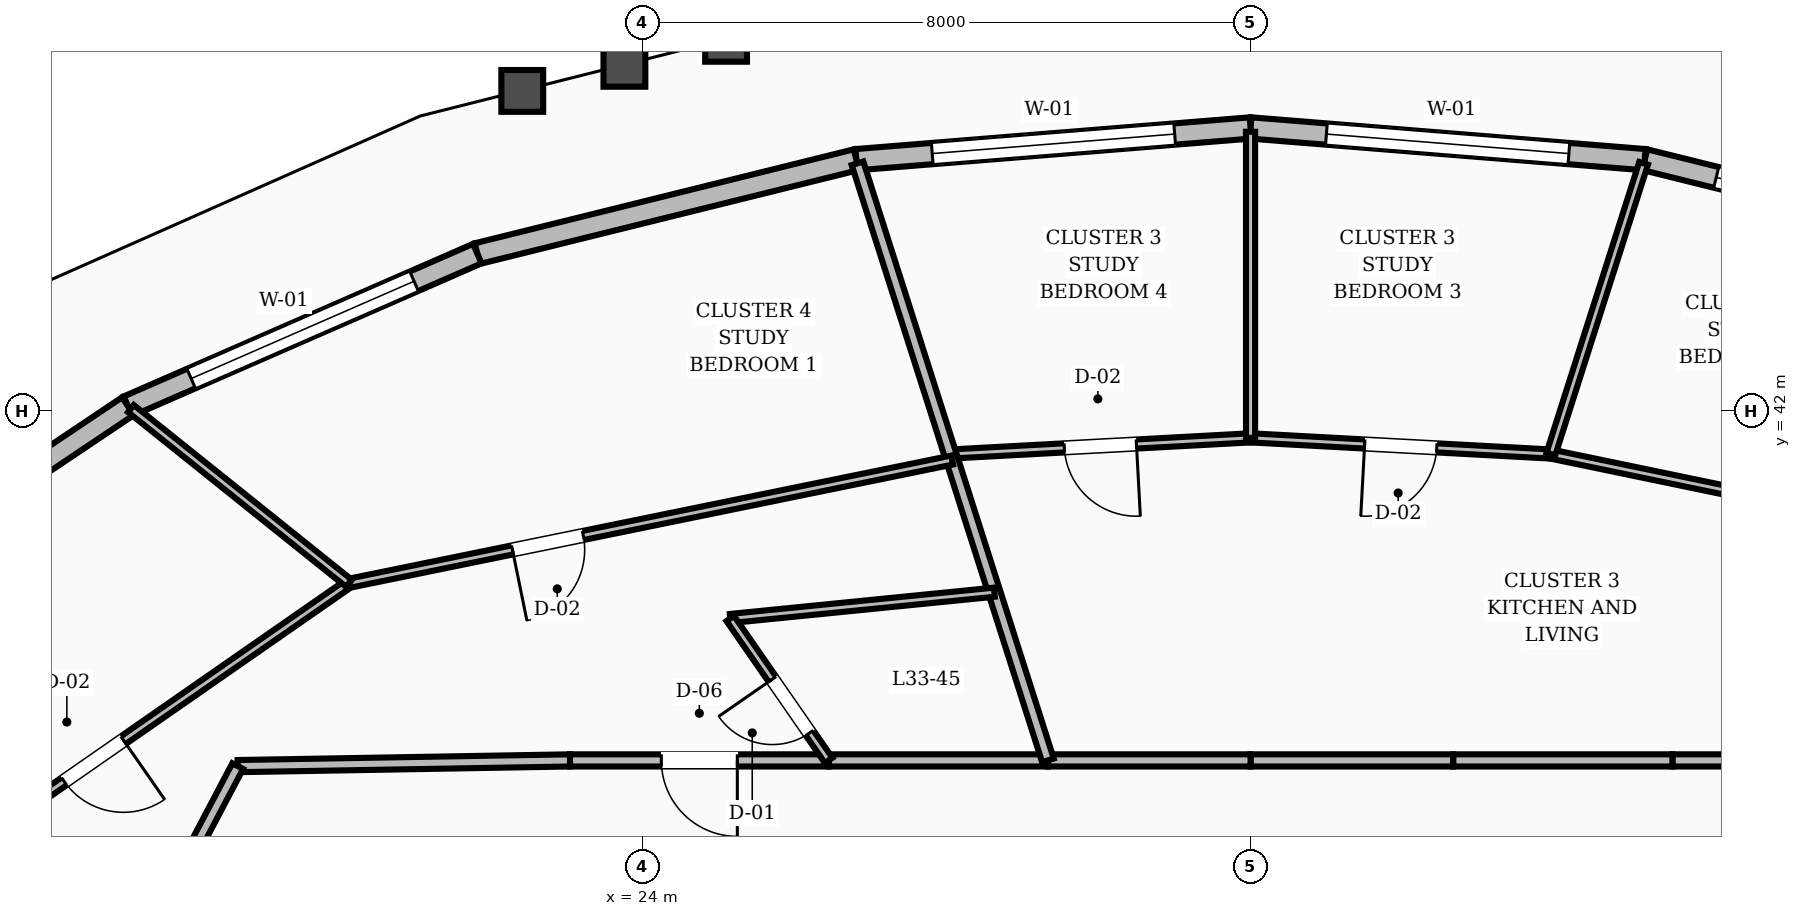
"""IFC4 building model, lengths in metres.
Left out: names, types, materials, properties, quantities, classifications, styles, units other than length and angle.
Written with IfcOpenShell. Run it as: python <this file> out.ifc"""

import sys

from ifc_helpers import new_model, si_unit, direction, frame, frame_2d, origin, place, context, subcontext, project, spatial, rectangle, extrude, element, fill, save


model = new_model("IFC4")
c1 = context("Model", 3, precision=1e-05, world=origin(), true_north=direction((0.0, 1.0)))
c2 = subcontext(c1, "Body", "Model", "MODEL_VIEW")
j1 = project(units=[si_unit("LENGTHUNIT", "METRE"), si_unit("PLANEANGLEUNIT", "RADIAN")], contexts=[c1])
p1 = place(None, origin())
s1 = spatial("IfcSite", under=j1, at=p1, CompositionType="ELEMENT")
p2 = place(p1, origin())
s2 = spatial("IfcBuilding", under=s1, at=p2, CompositionType="ELEMENT")
p3 = place(p2, frame((0.0, 0.0, 131.6)))
s3 = spatial("IfcBuildingStorey", under=s2, at=p3, CompositionType="ELEMENT", Elevation=131.6)
p4 = place(p3, frame((42.173, 44.067, 0.0), z_axis=(0.0, 0.0, 1.0), x_axis=(-0.970626922291, 0.24058964592, 0.0)))
e1 = element("IfcWall", 1, at=p4, inside=s3, PredefinedType="STANDARD", context=c2, shape_type="SweptSolid", body=[
    extrude(rectangle(XDim=5.138, YDim=0.28, at=frame_2d((2.569, 0.0))), origin(), (0.0, 0.0, 1.0), 2.82),
])
p5 = place(p4, frame((0.969, 0.0, 0.8)))
e2 = element("IfcOpeningElement", 2, at=p5, cuts=e1, PredefinedType="OPENING", context=c2, shape_type="SweptSolid", body=[
    extrude(rectangle(XDim=3.2, YDim=1.65, at=frame_2d((1.6, 0.825))), frame((0.0, 0.15, 0.0), z_axis=(0.0, -1.0, 0.0), x_axis=(1.0, 0.0, 0.0)), (0.0, 0.0, 1.0), 0.3),
])
p6 = place(p3, frame((37.186, 45.303, 0.0), z_axis=(0.0, 0.0, 1.0), x_axis=(-0.996775768856, 0.080237563656, 0.0)))
e3 = element("IfcWall", 3, at=p6, inside=s3, PredefinedType="STANDARD", context=c2, shape_type="SweptSolid", body=[
    extrude(rectangle(XDim=5.203, YDim=0.28, at=frame_2d((2.602, 0.0))), origin(), (0.0, 0.0, 1.0), 2.82),
])
p7 = place(p6, frame((1.001, 0.0, 0.8)))
e4 = element("IfcOpeningElement", 4, at=p7, cuts=e3, PredefinedType="OPENING", context=c2, shape_type="SweptSolid", body=[
    extrude(rectangle(XDim=3.2, YDim=1.65, at=frame_2d((1.6, 0.825))), frame((0.0, 0.15, 0.0), z_axis=(0.0, -1.0, 0.0), x_axis=(1.0, 0.0, 0.0)), (0.0, 0.0, 1.0), 0.3),
])
p8 = place(p3, frame((32.0, 45.721, 0.0), z_axis=(0.0, 0.0, 1.0), x_axis=(-0.996775768856, -0.080237563656, 0.0)))
e5 = element("IfcWall", 5, at=p8, inside=s3, PredefinedType="STANDARD", context=c2, shape_type="SweptSolid", body=[
    extrude(rectangle(XDim=5.203, YDim=0.28, at=frame_2d((2.602, 0.0))), origin(), (0.0, 0.0, 1.0), 2.82),
])
p9 = place(p8, frame((1.001, 0.0, 0.8)))
e6 = element("IfcOpeningElement", 6, at=p9, cuts=e5, PredefinedType="OPENING", context=c2, shape_type="SweptSolid", body=[
    extrude(rectangle(XDim=3.2, YDim=1.65, at=frame_2d((1.6, 0.825))), frame((0.0, 0.15, 0.0), z_axis=(0.0, -1.0, 0.0), x_axis=(1.0, 0.0, 0.0)), (0.0, 0.0, 1.0), 0.3),
])
p10 = place(p3, frame((26.814, 45.303, 0.0), z_axis=(0.0, 0.0, 1.0), x_axis=(-0.970626922291, -0.24058964592, 0.0)))
e7 = element("IfcWall", 7, at=p10, inside=s3, PredefinedType="STANDARD", context=c2, shape_type="SweptSolid", body=[
    extrude(rectangle(XDim=5.138, YDim=0.28, at=frame_2d((2.569, 0.0))), origin(), (0.0, 0.0, 1.0), 2.82),
])
p11 = place(p3, frame((21.827, 44.067, 0.0), z_axis=(0.0, 0.0, 1.0), x_axis=(-0.916424160111, -0.400208394171, 0.0)))
e8 = element("IfcWall", 8, at=p11, inside=s3, PredefinedType="STANDARD", context=c2, shape_type="SweptSolid", body=[
    extrude(rectangle(XDim=5.015, YDim=0.28, at=frame_2d((2.508, 0.0))), origin(), (0.0, 0.0, 1.0), 2.82),
])
p12 = place(p11, frame((0.908, 0.0, 0.8)))
e9 = element("IfcOpeningElement", 9, at=p12, cuts=e8, PredefinedType="OPENING", context=c2, shape_type="SweptSolid", body=[
    extrude(rectangle(XDim=3.2, YDim=1.65, at=frame_2d((1.6, 0.825))), frame((0.0, 0.15, 0.0), z_axis=(0.0, -1.0, 0.0), x_axis=(1.0, 0.0, 0.0)), (0.0, 0.0, 1.0), 0.3),
])
p13 = place(p3, frame((17.231, 42.06, 0.0), z_axis=(0.0, 0.0, 1.0), x_axis=(-0.830576039751, -0.556905236277, 0.0)))
e10 = element("IfcWall", 10, at=p13, inside=s3, PredefinedType="STANDARD", context=c2, shape_type="SweptSolid", body=[
    extrude(rectangle(XDim=4.85, YDim=0.28, at=frame_2d((2.425, 0.0))), origin(), (0.0, 0.0, 1.0), 2.82),
])
p14 = place(p3, frame((40.954, 37.4, 0.0), z_axis=(0.0, 0.0, 1.0), x_axis=(-1.0, 0.0, 0.0)))
e11 = element("IfcWall", 11, at=p14, inside=s3, PredefinedType="SOLIDWALL", context=c2, shape_type="SweptSolid", body=[
    extrude(rectangle(XDim=3.403, YDim=0.16, at=frame_2d((1.702, 0.0))), origin(), (0.0, 0.0, 1.0), 2.8),
])
p15 = place(p3, frame((37.551, 37.4, 0.0), z_axis=(0.0, 0.0, 1.0), x_axis=(-1.0, 0.0, 0.0)))
e12 = element("IfcWall", 12, at=p15, inside=s3, PredefinedType="SOLIDWALL", context=c2, shape_type="SweptSolid", body=[
    extrude(rectangle(XDim=2.885, YDim=0.16, at=frame_2d((1.443, 0.0))), origin(), (0.0, 0.0, 1.0), 2.8),
])
for number, where, z_axis, x_axis in (
    (13, (34.665, 37.4, 0.0), (0.0, 0.0, 1.0), (-1.0, 0.0, 0.0)),
    (14, (32.0, 37.4, 0.0), (0.0, 0.0, 1.0), (-1.0, 0.0, 0.0)),
):
    element("IfcWall", number, at=place(p3, frame(where, z_axis=z_axis, x_axis=x_axis)), inside=s3, PredefinedType="SOLIDWALL", context=c2, shape_type="SweptSolid", body=[
        extrude(rectangle(XDim=2.665, YDim=0.16, at=frame_2d((1.333, 0.0))), origin(), (0.0, 0.0, 1.0), 2.8),
    ])
p16 = place(p3, frame((29.335, 37.4, 0.0), z_axis=(0.0, 0.0, 1.0), x_axis=(-1.0, 0.0, 0.0)))
e15 = element("IfcWall", 15, at=p16, inside=s3, PredefinedType="SOLIDWALL", context=c2, shape_type="SweptSolid", body=[
    extrude(rectangle(XDim=2.885, YDim=0.16, at=frame_2d((1.443, 0.0))), origin(), (0.0, 0.0, 1.0), 2.8),
])
p17 = place(p3, frame((26.449, 37.4, 0.0), z_axis=(0.0, 0.0, 1.0), x_axis=(-1.0, 0.0, 0.0)))
e16 = element("IfcWall", 16, at=p17, inside=s3, PredefinedType="SOLIDWALL", context=c2, shape_type="SweptSolid", body=[
    extrude(rectangle(XDim=3.403, YDim=0.16, at=frame_2d((1.702, 0.0))), origin(), (0.0, 0.0, 1.0), 2.8),
])
p18 = place(p17, frame((1.201, 0.0, 0.0)))
e17 = element("IfcOpeningElement", 17, at=p18, cuts=e16, PredefinedType="OPENING", context=c2, shape_type="SweptSolid", body=[
    extrude(rectangle(XDim=1.0, YDim=2.1, at=frame_2d((0.5, 1.05))), frame((0.0, 0.09, 0.0), z_axis=(0.0, -1.0, 0.0), x_axis=(1.0, 0.0, 0.0)), (0.0, 0.0, 1.0), 0.18),
])
p19 = place(p3, frame((23.046, 37.4, 0.0), z_axis=(0.0, 0.0, 1.0), x_axis=(-0.999853038912, -0.017143528788, 0.0)))
e18 = element("IfcWall", 18, at=p19, inside=s3, PredefinedType="SOLIDWALL", context=c2, shape_type="SweptSolid", body=[
    extrude(rectangle(XDim=4.372, YDim=0.16, at=frame_2d((2.186, 0.0))), origin(), (0.0, 0.0, 1.0), 2.8),
])
p20 = place(p3, frame((18.675, 37.325, 0.0), z_axis=(0.0, 0.0, 1.0), x_axis=(-0.466737093093, -0.884396113702, 0.0)))
e19 = element("IfcWall", 19, at=p20, inside=s3, PredefinedType="SOLIDWALL", context=c2, shape_type="SweptSolid", body=[
    extrude(rectangle(XDim=3.696, YDim=0.16, at=frame_2d((1.848, 0.0))), origin(), (0.0, 0.0, 1.0), 2.8),
])
p21 = place(p3, frame((43.919, 39.777, 0.0), z_axis=(0.0, 0.0, 1.0), x_axis=(-0.97912865648, 0.20324141817, 0.0)))
e20 = element("IfcWall", 20, at=p21, inside=s3, PredefinedType="PARTITIONING", context=c2, shape_type="SweptSolid", body=[
    extrude(rectangle(XDim=8.138, YDim=0.12, at=frame_2d((4.069, 0.0))), origin(), (0.0, 0.0, 1.0), 2.8),
])
p22 = place(p21, frame((3.594, 0.0, 0.0)))
e21 = element("IfcOpeningElement", 21, at=p22, cuts=e20, PredefinedType="OPENING", context=c2, shape_type="SweptSolid", body=[
    extrude(rectangle(XDim=0.95, YDim=2.1, at=frame_2d((0.475, 1.05))), frame((0.0, 0.07, 0.0), z_axis=(0.0, -1.0, 0.0), x_axis=(1.0, 0.0, 0.0)), (0.0, 0.0, 1.0), 0.14),
])
p23 = place(p3, frame((35.951, 41.431, 0.0), z_axis=(0.0, 0.0, 1.0), x_axis=(-0.998551426798, 0.053805650631, 0.0)))
e22 = element("IfcWall", 22, at=p23, inside=s3, PredefinedType="PARTITIONING", context=c2, shape_type="SweptSolid", body=[
    extrude(rectangle(XDim=3.957, YDim=0.12, at=frame_2d((1.978, 0.0))), origin(), (0.0, 0.0, 1.0), 2.8),
])
p24 = place(p23, frame((1.503, 0.0, 0.0)))
e23 = element("IfcOpeningElement", 23, at=p24, cuts=e22, PredefinedType="OPENING", context=c2, shape_type="SweptSolid", body=[
    extrude(rectangle(XDim=0.95, YDim=2.1, at=frame_2d((0.475, 1.05))), frame((0.0, 0.07, 0.0), z_axis=(0.0, -1.0, 0.0), x_axis=(1.0, 0.0, 0.0)), (0.0, 0.0, 1.0), 0.14),
])
p25 = place(p3, frame((35.951, 41.431, 0.0), z_axis=(0.0, 0.0, 1.0), x_axis=(0.303868730984, 0.952713910012, 0.0)))
e24 = element("IfcWall", 24, at=p25, inside=s3, PredefinedType="PARTITIONING", context=c2, shape_type="SweptSolid", body=[
    extrude(rectangle(XDim=4.015, YDim=0.12, at=frame_2d((2.007, 0.0))), origin(), (0.0, 0.0, 1.0), 2.8),
])
p26 = place(p3, frame((32.0, 41.644, 0.0), z_axis=(0.0, 0.0, 1.0), x_axis=(-0.998551426798, -0.053805650631, 0.0)))
e25 = element("IfcWall", 25, at=p26, inside=s3, PredefinedType="PARTITIONING", context=c2, shape_type="SweptSolid", body=[
    extrude(rectangle(XDim=3.957, YDim=0.12, at=frame_2d((1.978, 0.0))), origin(), (0.0, 0.0, 1.0), 2.8),
])
p27 = place(p26, frame((1.503, 0.0, 0.0)))
e26 = element("IfcOpeningElement", 26, at=p27, cuts=e25, PredefinedType="OPENING", context=c2, shape_type="SweptSolid", body=[
    extrude(rectangle(XDim=0.95, YDim=2.1, at=frame_2d((0.475, 1.05))), frame((0.0, 0.07, 0.0), z_axis=(0.0, -1.0, 0.0), x_axis=(1.0, 0.0, 0.0)), (0.0, 0.0, 1.0), 0.14),
])
p28 = place(p3, frame((32.0, 41.644, 0.0), z_axis=(0.0, 0.0, 1.0), x_axis=(0.0, 1.0, 0.0)))
e27 = element("IfcWall", 27, at=p28, inside=s3, PredefinedType="PARTITIONING", context=c2, shape_type="SweptSolid", body=[
    extrude(rectangle(XDim=4.027, YDim=0.12, at=frame_2d((2.014, 0.0))), origin(), (0.0, 0.0, 1.0), 2.8),
])
p29 = place(p3, frame((29.335, 37.4, 0.0), z_axis=(0.0, 0.0, 1.0), x_axis=(-0.303872079368, 0.952712842036, 0.0)))
e28 = element("IfcWall", 28, at=p29, inside=s3, PredefinedType="SOLIDWALL", context=c2, shape_type="SweptSolid", body=[
    extrude(rectangle(XDim=8.246, YDim=0.16, at=frame_2d((4.123, 0.0))), origin(), (0.0, 0.0, 1.0), 2.8),
])
p30 = place(p3, frame((28.629, 39.613, 0.0), z_axis=(0.0, 0.0, 1.0), x_axis=(-0.995077271549, -0.099102086996, 0.0)))
e29 = element("IfcWall", 29, at=p30, inside=s3, PredefinedType="PARTITIONING", context=c2, shape_type="SweptSolid", body=[
    extrude(rectangle(XDim=3.491, YDim=0.12, at=frame_2d((1.745, 0.0))), origin(), (0.0, 0.0, 1.0), 2.8),
])
p31 = place(p3, frame((26.449, 37.4, 0.0), z_axis=(0.0, 0.0, 1.0), x_axis=(-0.569712844613, 0.821843826212, 0.0)))
e30 = element("IfcWall", 30, at=p31, inside=s3, PredefinedType="PARTITIONING", context=c2, shape_type="SweptSolid", body=[
    extrude(rectangle(XDim=2.272, YDim=0.12, at=frame_2d((1.136, 0.0))), origin(), (0.0, 0.0, 1.0), 2.8),
])
p32 = place(p31, frame((0.44, 0.0, 0.0)))
e31 = element("IfcOpeningElement", 31, at=p32, cuts=e30, PredefinedType="OPENING", context=c2, shape_type="SweptSolid", body=[
    extrude(rectangle(XDim=0.86, YDim=2.1, at=frame_2d((0.43, 1.05))), frame((0.0, 0.07, 0.0), z_axis=(0.0, -1.0, 0.0), x_axis=(1.0, 0.0, 0.0)), (0.0, 0.0, 1.0), 0.14),
])
p33 = place(p3, frame((28.074, 41.352, 0.0), z_axis=(0.0, 0.0, 1.0), x_axis=(-0.979753649481, -0.200206858844, 0.0)))
e32 = element("IfcWall", 32, at=p33, inside=s3, PredefinedType="PARTITIONING", context=c2, shape_type="SweptSolid", body=[
    extrude(rectangle(XDim=8.1, YDim=0.12, at=frame_2d((4.05, 0.0))), origin(), (0.0, 0.0, 1.0), 2.8),
])
p34 = place(p33, frame((4.954, 0.0, 0.0)))
e33 = element("IfcOpeningElement", 33, at=p34, cuts=e32, PredefinedType="OPENING", context=c2, shape_type="SweptSolid", body=[
    extrude(rectangle(XDim=0.95, YDim=2.1, at=frame_2d((0.475, 1.05))), frame((0.0, 0.07, 0.0), z_axis=(0.0, -1.0, 0.0), x_axis=(1.0, 0.0, 0.0)), (0.0, 0.0, 1.0), 0.14),
])
p35 = place(p3, frame((20.139, 39.73, 0.0), z_axis=(0.0, 0.0, 1.0), x_axis=(-0.82110532268, -0.570776706837, 0.0)))
e34 = element("IfcWall", 34, at=p35, inside=s3, PredefinedType="PARTITIONING", context=c2, shape_type="SweptSolid", body=[
    extrude(rectangle(XDim=8.179, YDim=0.12, at=frame_2d((4.089, 0.0))), origin(), (0.0, 0.0, 1.0), 2.8),
])
p36 = place(p35, frame((3.614, 0.0, 0.0)))
e35 = element("IfcOpeningElement", 35, at=p36, cuts=e34, PredefinedType="OPENING", context=c2, shape_type="SweptSolid", body=[
    extrude(rectangle(XDim=0.95, YDim=2.1, at=frame_2d((0.475, 1.05))), frame((0.0, 0.07, 0.0), z_axis=(0.0, -1.0, 0.0), x_axis=(1.0, 0.0, 0.0)), (0.0, 0.0, 1.0), 0.14),
])
p37 = place(p3, frame((20.139, 39.73, 0.0), z_axis=(0.0, 0.0, 1.0), x_axis=(-0.780350196962, 0.625342762093, 0.0)))
e36 = element("IfcWall", 36, at=p37, inside=s3, PredefinedType="PARTITIONING", context=c2, shape_type="SweptSolid", body=[
    extrude(rectangle(XDim=3.676, YDim=0.12, at=frame_2d((1.838, 0.0))), origin(), (0.0, 0.0, 1.0), 2.8),
])
p38 = place(p5, origin())
e37 = element("IfcWindow", 37, at=p38, inside=s3, PartitioningType="SINGLE_PANEL", PredefinedType="WINDOW", context=c2, shape_type="SweptSolid", body=[
    extrude(rectangle(XDim=3.2, YDim=1.65, at=frame_2d((1.6, 0.825))), frame((0.0, 0.03, 0.0), z_axis=(0.0, -1.0, 0.0), x_axis=(1.0, 0.0, 0.0)), (0.0, 0.0, 1.0), 0.06),
])
fill(e2, e37)
p39 = place(p7, origin())
e38 = element("IfcWindow", 38, at=p39, inside=s3, PartitioningType="SINGLE_PANEL", PredefinedType="WINDOW", context=c2, shape_type="SweptSolid", body=[
    extrude(rectangle(XDim=3.2, YDim=1.65, at=frame_2d((1.6, 0.825))), frame((0.0, 0.03, 0.0), z_axis=(0.0, -1.0, 0.0), x_axis=(1.0, 0.0, 0.0)), (0.0, 0.0, 1.0), 0.06),
])
fill(e4, e38)
p40 = place(p9, origin())
e39 = element("IfcWindow", 39, at=p40, inside=s3, PartitioningType="SINGLE_PANEL", PredefinedType="WINDOW", context=c2, shape_type="SweptSolid", body=[
    extrude(rectangle(XDim=3.2, YDim=1.65, at=frame_2d((1.6, 0.825))), frame((0.0, 0.03, 0.0), z_axis=(0.0, -1.0, 0.0), x_axis=(1.0, 0.0, 0.0)), (0.0, 0.0, 1.0), 0.06),
])
fill(e6, e39)
p41 = place(p12, origin())
e40 = element("IfcWindow", 40, at=p41, inside=s3, PartitioningType="SINGLE_PANEL", PredefinedType="WINDOW", context=c2, shape_type="SweptSolid", body=[
    extrude(rectangle(XDim=3.2, YDim=1.65, at=frame_2d((1.6, 0.825))), frame((0.0, 0.03, 0.0), z_axis=(0.0, -1.0, 0.0), x_axis=(1.0, 0.0, 0.0)), (0.0, 0.0, 1.0), 0.06),
])
fill(e9, e40)
p42 = place(p24, origin())
e41 = element("IfcDoor", 41, at=p42, inside=s3, OperationType="SINGLE_SWING_RIGHT", PredefinedType="DOOR", context=c2, shape_type="SweptSolid", body=[
    extrude(rectangle(XDim=0.95, YDim=2.1, at=frame_2d((0.475, 1.05))), frame((0.0, 0.025, 0.0), z_axis=(0.0, -1.0, 0.0), x_axis=(1.0, 0.0, 0.0)), (0.0, 0.0, 1.0), 0.05),
])
fill(e23, e41)
p43 = place(p27, origin())
e42 = element("IfcDoor", 42, at=p43, inside=s3, OperationType="SINGLE_SWING_LEFT", PredefinedType="DOOR", context=c2, shape_type="SweptSolid", body=[
    extrude(rectangle(XDim=0.95, YDim=2.1, at=frame_2d((0.475, 1.05))), frame((0.0, 0.025, 0.0), z_axis=(0.0, -1.0, 0.0), x_axis=(1.0, 0.0, 0.0)), (0.0, 0.0, 1.0), 0.05),
])
fill(e26, e42)
p44 = place(p32, origin())
e43 = element("IfcDoor", 43, at=p44, inside=s3, OperationType="SINGLE_SWING_RIGHT", PredefinedType="DOOR", context=c2, shape_type="SweptSolid", body=[
    extrude(rectangle(XDim=0.86, YDim=2.1, at=frame_2d((0.43, 1.05))), frame((0.0, 0.025, 0.0), z_axis=(0.0, -1.0, 0.0), x_axis=(1.0, 0.0, 0.0)), (0.0, 0.0, 1.0), 0.05),
])
fill(e31, e43)
p45 = place(p18, origin())
e44 = element("IfcDoor", 44, at=p45, inside=s3, OperationType="SINGLE_SWING_LEFT", PredefinedType="DOOR", context=c2, shape_type="SweptSolid", body=[
    extrude(rectangle(XDim=1.0, YDim=2.1, at=frame_2d((0.5, 1.05))), frame((0.0, 0.025, 0.0), z_axis=(0.0, -1.0, 0.0), x_axis=(1.0, 0.0, 0.0)), (0.0, 0.0, 1.0), 0.05),
])
fill(e17, e44)
p46 = place(p34, origin())
e45 = element("IfcDoor", 45, at=p46, inside=s3, OperationType="SINGLE_SWING_RIGHT", PredefinedType="DOOR", context=c2, shape_type="SweptSolid", body=[
    extrude(rectangle(XDim=0.95, YDim=2.1, at=frame_2d((0.475, 1.05))), frame((0.0, 0.025, 0.0), z_axis=(0.0, -1.0, 0.0), x_axis=(1.0, 0.0, 0.0)), (0.0, 0.0, 1.0), 0.05),
])
fill(e33, e45)
p47 = place(p36, origin())
e46 = element("IfcDoor", 46, at=p47, inside=s3, OperationType="SINGLE_SWING_LEFT", PredefinedType="DOOR", context=c2, shape_type="SweptSolid", body=[
    extrude(rectangle(XDim=0.95, YDim=2.1, at=frame_2d((0.475, 1.05))), frame((0.0, 0.025, 0.0), z_axis=(0.0, -1.0, 0.0), x_axis=(1.0, 0.0, 0.0)), (0.0, 0.0, 1.0), 0.05),
])
fill(e35, e46)
save(model, sys.argv[1])
